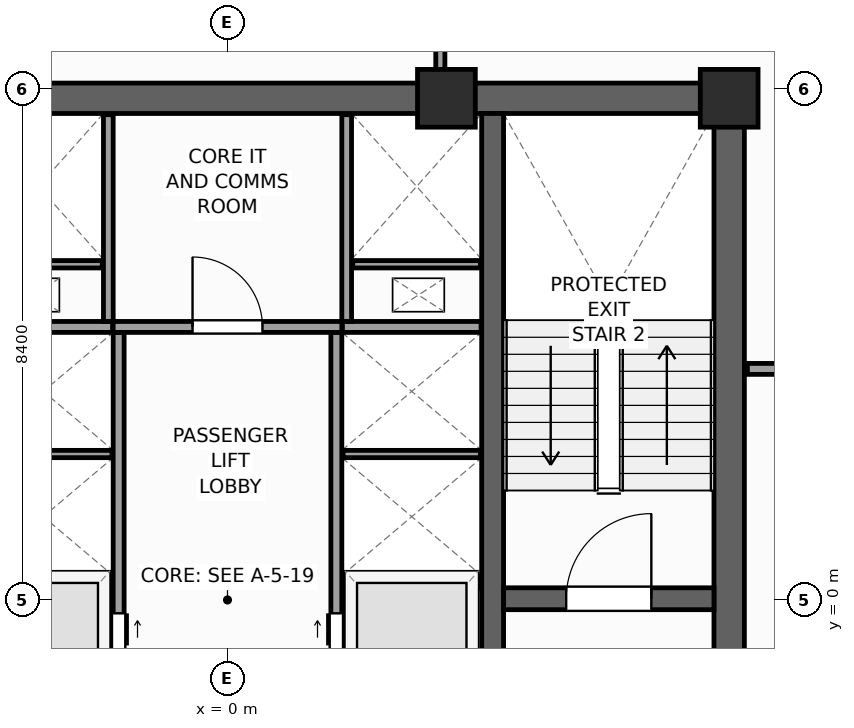
"""IFC4 building model, lengths in metres.
Left out: names, types, materials, properties, quantities, classifications, styles, units other than length and angle.
Written with IfcOpenShell. Run it as: python <this file> out.ifc"""

import sys

from ifc_helpers import new_model, si_unit, direction, frame, frame_2d, origin, origin_2d, place, context, subcontext, project, spatial, rectangle, extrude, source, transform, mapped, element, fill, save


model = new_model("IFC4")
c1 = context("Model", 3, precision=1e-05, world=origin(), true_north=direction((0.0, 1.0)))
c2 = subcontext(c1, "Body", "Model", "MODEL_VIEW")
j1 = project(units=[si_unit("LENGTHUNIT", "METRE"), si_unit("PLANEANGLEUNIT", "RADIAN")], contexts=[c1])
p1 = place(None, origin())
s1 = spatial("IfcSite", under=j1, at=p1, CompositionType="ELEMENT")
p2 = place(p1, origin())
s2 = spatial("IfcBuilding", under=s1, at=p2, CompositionType="ELEMENT")
p3 = place(p2, frame((0.0, 0.0, 229.0)))
s3 = spatial("IfcBuildingStorey", under=s2, at=p3, CompositionType="ELEMENT", Elevation=229.0)
p4 = place(p3, frame((-8.5, 8.25, 0.0), z_axis=(0.0, 0.0, 1.0), x_axis=(1.0, 0.0, 0.0)))
e1 = element("IfcWall", 1, at=p4, inside=s3, PredefinedType="SHEAR", context=c2, shape_type="SweptSolid", body=[
    extrude(rectangle(XDim=17.0, YDim=0.5, at=frame_2d((8.5, 0.0))), origin(), (0.0, 0.0, 1.0), 3.9),
])
p5 = place(p3, frame((8.25, -8.0, 0.0), z_axis=(0.0, 0.0, 1.0), x_axis=(0.0, 1.0, 0.0)))
e2 = element("IfcWall", 2, at=p5, inside=s3, PredefinedType="SHEAR", context=c2, shape_type="SweptSolid", body=[
    extrude(rectangle(XDim=16.0, YDim=0.5, at=frame_2d((8.0, 0.0))), origin(), (0.0, 0.0, 1.0), 3.9),
])
p6 = place(p5, frame((4.69, 0.0, 0.0)))
e3 = element("IfcOpeningElement", 3, at=p6, cuts=e2, PredefinedType="OPENING", context=c2, shape_type="SweptSolid", body=[
    extrude(rectangle(XDim=1.3, YDim=2.2, at=frame_2d((0.65, 1.1))), frame((0.0, 0.26, 0.0), z_axis=(0.0, -1.0, 0.0), x_axis=(1.0, 0.0, 0.0)), (0.0, 0.0, 1.0), 0.52),
])
p7 = place(p3, frame((4.36, -8.0, 0.0), z_axis=(0.0, 0.0, 1.0), x_axis=(0.0, 1.0, 0.0)))
e4 = element("IfcWall", 4, at=p7, inside=s3, PredefinedType="SHEAR", context=c2, shape_type="SweptSolid", body=[
    extrude(rectangle(XDim=16.0, YDim=0.36, at=frame_2d((8.0, 0.0))), origin(), (0.0, 0.0, 1.0), 3.9),
])
p8 = place(p3, frame((4.54, 0.02, 0.0), z_axis=(0.0, 0.0, 1.0), x_axis=(1.0, 0.0, 0.0)))
e5 = element("IfcWall", 5, at=p8, inside=s3, PredefinedType="SHEAR", context=c2, shape_type="SweptSolid", body=[
    extrude(rectangle(XDim=3.46, YDim=0.36, at=frame_2d((1.73, 0.0))), origin(), (0.0, 0.0, 1.0), 3.9),
])
p9 = place(p8, frame((1.03, 0.0, 0.0)))
e6 = element("IfcOpeningElement", 6, at=p9, cuts=e5, PredefinedType="OPENING", context=c2, shape_type="SweptSolid", body=[
    extrude(rectangle(XDim=1.4, YDim=2.2, at=frame_2d((0.7, 1.1))), frame((0.0, 0.19, 0.0), z_axis=(0.0, -1.0, 0.0), x_axis=(1.0, 0.0, 0.0)), (0.0, 0.0, 1.0), 0.38),
])
m1 = source(origin(), c2, "Body", "SweptSolid", [
    extrude(rectangle(XDim=0.95, YDim=0.95, at=origin_2d()), origin(), (0.0, 0.0, 1.0), 3.9),
])
for number, where, z_axis, x_axis in (
    (7, (8.25, 8.25, 0.0), (0.0, 0.0, 1.0), (1.0, 0.0, 0.0)),
    (8, (3.6, 8.25, 0.0), (0.0, 0.0, 1.0), (1.0, 0.0, 0.0)),
):
    element("IfcColumn", number, at=place(p3, frame(where, z_axis=z_axis, x_axis=x_axis)), inside=s3, PredefinedType="PILASTER", context=c2, shape_type="MappedRepresentation", body=[
        mapped(m1, transform((0.0, 0.0, 0.0), scale=1.0)),
    ])
p10 = place(p3, frame((6.733, -29.154, 0.0), z_axis=(0.0, 0.0, 1.0), x_axis=(0.629325378072, 0.77714192302, 0.0)))
e9 = element("IfcWall", 9, at=p10, inside=s3, PredefinedType="STANDARD", context=c2, shape_type="SweptSolid", body=[
    extrude(rectangle(XDim=36.84, YDim=0.34, at=frame_2d((18.42, 0.0))), origin(), (0.0, 0.0, 1.0), 2.96),
])
p11 = place(p10, frame((3.721, 0.0, 0.48)))
e10 = element("IfcOpeningElement", 10, at=p11, cuts=e9, PredefinedType="OPENING", context=c2, shape_type="SweptSolid", body=[
    extrude(rectangle(XDim=1.4, YDim=2.4, at=frame_2d((0.7, 1.2))), frame((0.0, 0.18, 0.0), z_axis=(0.0, -1.0, 0.0), x_axis=(1.0, 0.0, 0.0)), (0.0, 0.0, 1.0), 0.36),
])
p12 = place(p10, frame((9.809, 0.0, 0.58)))
e11 = element("IfcOpeningElement", 11, at=p12, cuts=e9, PredefinedType="OPENING", context=c2, shape_type="SweptSolid", body=[
    extrude(rectangle(XDim=1.75, YDim=2.3, at=frame_2d((0.875, 1.15))), frame((0.0, 0.18, 0.0), z_axis=(0.0, -1.0, 0.0), x_axis=(1.0, 0.0, 0.0)), (0.0, 0.0, 1.0), 0.36),
])
p13 = place(p10, frame((16.058, 0.0, 0.58)))
e12 = element("IfcOpeningElement", 12, at=p13, cuts=e9, PredefinedType="OPENING", context=c2, shape_type="SweptSolid", body=[
    extrude(rectangle(XDim=1.75, YDim=2.3, at=frame_2d((0.875, 1.15))), frame((0.0, 0.18, 0.0), z_axis=(0.0, -1.0, 0.0), x_axis=(1.0, 0.0, 0.0)), (0.0, 0.0, 1.0), 0.36),
])
p14 = place(p10, frame((24.176, 0.0, 0.58)))
e13 = element("IfcOpeningElement", 13, at=p14, cuts=e9, PredefinedType="OPENING", context=c2, shape_type="SweptSolid", body=[
    extrude(rectangle(XDim=1.75, YDim=2.3, at=frame_2d((0.875, 1.15))), frame((0.0, 0.18, 0.0), z_axis=(0.0, -1.0, 0.0), x_axis=(1.0, 0.0, 0.0)), (0.0, 0.0, 1.0), 0.36),
])
p15 = place(p10, frame((30.982, 0.0, 0.48)))
e14 = element("IfcOpeningElement", 14, at=p15, cuts=e9, PredefinedType="OPENING", context=c2, shape_type="SweptSolid", body=[
    extrude(rectangle(XDim=1.4, YDim=2.4, at=frame_2d((0.7, 1.2))), frame((0.0, 0.18, 0.0), z_axis=(0.0, -1.0, 0.0), x_axis=(1.0, 0.0, 0.0)), (0.0, 0.0, 1.0), 0.36),
])
p16 = place(p3, frame((29.154, 6.733, 0.0), z_axis=(0.0, 0.0, 1.0), x_axis=(-0.77714192302, 0.629325378072, 0.0)))
e15 = element("IfcWall", 15, at=p16, inside=s3, PredefinedType="STANDARD", context=c2, shape_type="SweptSolid", body=[
    extrude(rectangle(XDim=36.84, YDim=0.34, at=frame_2d((18.42, 0.0))), origin(), (0.0, 0.0, 1.0), 2.96),
])
p17 = place(p16, frame((23.495, 0.0, 0.0)))
e16 = element("IfcOpeningElement", 16, at=p17, cuts=e15, PredefinedType="OPENING", context=c2, shape_type="SweptSolid", body=[
    extrude(rectangle(XDim=1.05, YDim=2.25, at=frame_2d((0.525, 1.125))), frame((0.0, 0.18, 0.0), z_axis=(0.0, -1.0, 0.0), x_axis=(1.0, 0.0, 0.0)), (0.0, 0.0, 1.0), 0.36),
])
p18 = place(p16, frame((3.721, 0.0, 0.48)))
e17 = element("IfcOpeningElement", 17, at=p18, cuts=e15, PredefinedType="OPENING", context=c2, shape_type="SweptSolid", body=[
    extrude(rectangle(XDim=1.4, YDim=2.4, at=frame_2d((0.7, 1.2))), frame((0.0, 0.18, 0.0), z_axis=(0.0, -1.0, 0.0), x_axis=(1.0, 0.0, 0.0)), (0.0, 0.0, 1.0), 0.36),
])
p19 = place(p16, frame((9.809, 0.0, 0.58)))
e18 = element("IfcOpeningElement", 18, at=p19, cuts=e15, PredefinedType="OPENING", context=c2, shape_type="SweptSolid", body=[
    extrude(rectangle(XDim=1.75, YDim=2.3, at=frame_2d((0.875, 1.15))), frame((0.0, 0.18, 0.0), z_axis=(0.0, -1.0, 0.0), x_axis=(1.0, 0.0, 0.0)), (0.0, 0.0, 1.0), 0.36),
])
p20 = place(p16, frame((16.058, 0.0, 0.58)))
e19 = element("IfcOpeningElement", 19, at=p20, cuts=e15, PredefinedType="OPENING", context=c2, shape_type="SweptSolid", body=[
    extrude(rectangle(XDim=1.75, YDim=2.3, at=frame_2d((0.875, 1.15))), frame((0.0, 0.18, 0.0), z_axis=(0.0, -1.0, 0.0), x_axis=(1.0, 0.0, 0.0)), (0.0, 0.0, 1.0), 0.36),
])
p21 = place(p16, frame((25.676, 0.0, 0.58)))
e20 = element("IfcOpeningElement", 20, at=p21, cuts=e15, PredefinedType="OPENING", context=c2, shape_type="SweptSolid", body=[
    extrude(rectangle(XDim=1.75, YDim=2.3, at=frame_2d((0.875, 1.15))), frame((0.0, 0.18, 0.0), z_axis=(0.0, -1.0, 0.0), x_axis=(1.0, 0.0, 0.0)), (0.0, 0.0, 1.0), 0.36),
])
p22 = place(p16, frame((30.982, 0.0, 0.48)))
e21 = element("IfcOpeningElement", 21, at=p22, cuts=e15, PredefinedType="OPENING", context=c2, shape_type="SweptSolid", body=[
    extrude(rectangle(XDim=1.4, YDim=2.4, at=frame_2d((0.7, 1.2))), frame((0.0, 0.18, 0.0), z_axis=(0.0, -1.0, 0.0), x_axis=(1.0, 0.0, 0.0)), (0.0, 0.0, 1.0), 0.36),
])
p23 = place(p3, frame((-1.79, -7.98, 0.0), z_axis=(0.0, 0.0, 1.0), x_axis=(0.0, 1.0, 0.0)))
e22 = element("IfcWall", 22, at=p23, inside=s3, PredefinedType="PARTITIONING", context=c2, shape_type="SweptSolid", body=[
    extrude(rectangle(XDim=12.38, YDim=0.18, at=frame_2d((6.19, 0.0))), origin(), (0.0, 0.0, 1.0), 3.66),
])
p24 = place(p23, frame((4.6, 0.0, 0.0)))
e23 = element("IfcOpeningElement", 23, at=p24, cuts=e22, PredefinedType="OPENING", context=c2, shape_type="SweptSolid", body=[
    extrude(rectangle(XDim=1.1, YDim=2.2, at=frame_2d((0.55, 1.1))), frame((0.0, 0.1, 0.0), z_axis=(0.0, -1.0, 0.0), x_axis=(1.0, 0.0, 0.0)), (0.0, 0.0, 1.0), 0.2),
])
p25 = place(p23, frame((6.66, 0.0, 0.0)))
e24 = element("IfcOpeningElement", 24, at=p25, cuts=e22, PredefinedType="OPENING", context=c2, shape_type="SweptSolid", body=[
    extrude(rectangle(XDim=1.1, YDim=2.2, at=frame_2d((0.55, 1.1))), frame((0.0, 0.1, 0.0), z_axis=(0.0, -1.0, 0.0), x_axis=(1.0, 0.0, 0.0)), (0.0, 0.0, 1.0), 0.2),
])
p26 = place(p23, frame((1.4, 0.0, 0.0)))
e25 = element("IfcOpeningElement", 25, at=p26, cuts=e22, PredefinedType="OPENING", context=c2, shape_type="SweptSolid", body=[
    extrude(rectangle(XDim=1.15, YDim=2.25, at=frame_2d((0.575, 1.125))), frame((0.0, 0.1, 0.0), z_axis=(0.0, -1.0, 0.0), x_axis=(1.0, 0.0, 0.0)), (0.0, 0.0, 1.0), 0.2),
])
p27 = place(p3, frame((1.79, -7.98, 0.0), z_axis=(0.0, 0.0, 1.0), x_axis=(0.0, 1.0, 0.0)))
e26 = element("IfcWall", 26, at=p27, inside=s3, PredefinedType="PARTITIONING", context=c2, shape_type="SweptSolid", body=[
    extrude(rectangle(XDim=12.38, YDim=0.18, at=frame_2d((6.19, 0.0))), origin(), (0.0, 0.0, 1.0), 3.66),
])
p28 = place(p27, frame((4.6, 0.0, 0.0)))
e27 = element("IfcOpeningElement", 27, at=p28, cuts=e26, PredefinedType="OPENING", context=c2, shape_type="SweptSolid", body=[
    extrude(rectangle(XDim=1.1, YDim=2.2, at=frame_2d((0.55, 1.1))), frame((0.0, 0.1, 0.0), z_axis=(0.0, -1.0, 0.0), x_axis=(1.0, 0.0, 0.0)), (0.0, 0.0, 1.0), 0.2),
])
p29 = place(p27, frame((6.66, 0.0, 0.0)))
e28 = element("IfcOpeningElement", 28, at=p29, cuts=e26, PredefinedType="OPENING", context=c2, shape_type="SweptSolid", body=[
    extrude(rectangle(XDim=1.1, YDim=2.2, at=frame_2d((0.55, 1.1))), frame((0.0, 0.1, 0.0), z_axis=(0.0, -1.0, 0.0), x_axis=(1.0, 0.0, 0.0)), (0.0, 0.0, 1.0), 0.2),
])
p30 = place(p27, frame((0.35, 0.0, 0.0)))
e29 = element("IfcOpeningElement", 29, at=p30, cuts=e26, PredefinedType="OPENING", context=c2, shape_type="SweptSolid", body=[
    extrude(rectangle(XDim=0.88, YDim=2.1, at=frame_2d((0.44, 1.05))), frame((0.0, 0.1, 0.0), z_axis=(0.0, -1.0, 0.0), x_axis=(1.0, 0.0, 0.0)), (0.0, 0.0, 1.0), 0.2),
])
p31 = place(p27, frame((2.25, 0.0, 0.0)))
e30 = element("IfcOpeningElement", 30, at=p31, cuts=e26, PredefinedType="OPENING", context=c2, shape_type="SweptSolid", body=[
    extrude(rectangle(XDim=1.15, YDim=2.25, at=frame_2d((0.575, 1.125))), frame((0.0, 0.1, 0.0), z_axis=(0.0, -1.0, 0.0), x_axis=(1.0, 0.0, 0.0)), (0.0, 0.0, 1.0), 0.2),
])
p32 = place(p3, frame((-1.88, 4.49, 0.0), z_axis=(0.0, 0.0, 1.0), x_axis=(1.0, 0.0, 0.0)))
e31 = element("IfcWall", 31, at=p32, inside=s3, PredefinedType="PARTITIONING", context=c2, shape_type="SweptSolid", body=[
    extrude(rectangle(XDim=3.76, YDim=0.18, at=frame_2d((1.88, 0.0))), origin(), (0.0, 0.0, 1.0), 3.66),
])
p33 = place(p32, frame((1.305, 0.0, 0.0)))
e32 = element("IfcOpeningElement", 32, at=p33, cuts=e31, PredefinedType="OPENING", context=c2, shape_type="SweptSolid", body=[
    extrude(rectangle(XDim=1.15, YDim=2.25, at=frame_2d((0.575, 1.125))), frame((0.0, 0.1, 0.0), z_axis=(0.0, -1.0, 0.0), x_axis=(1.0, 0.0, 0.0)), (0.0, 0.0, 1.0), 0.2),
])
for number, where, z_axis, x_axis in (
    (33, (-4.17, 0.3, 0.0), (0.0, 0.0, 1.0), (1.0, 0.0, 0.0)),
    (34, (1.89, 0.3, 0.0), (0.0, 0.0, 1.0), (1.0, 0.0, 0.0)),
    (35, (-4.17, 4.49, 0.0), (0.0, 0.0, 1.0), (1.0, 0.0, 0.0)),
    (36, (1.89, 4.49, 0.0), (0.0, 0.0, 1.0), (1.0, 0.0, 0.0)),
):
    element("IfcWall", number, at=place(p3, frame(where, z_axis=z_axis, x_axis=x_axis)), inside=s3, PredefinedType="PARTITIONING", context=c2, shape_type="SweptSolid", body=[
        extrude(rectangle(XDim=2.28, YDim=0.18, at=frame_2d((1.14, 0.0))), origin(), (0.0, 0.0, 1.0), 3.66),
    ])
for number, where, z_axis, x_axis in (
    (37, (-4.16, 2.4, 0.0), (0.0, 0.0, 1.0), (1.0, 0.0, 0.0)),
    (38, (1.9, 2.4, 0.0), (0.0, 0.0, 1.0), (1.0, 0.0, 0.0)),
):
    element("IfcWall", number, at=place(p3, frame(where, z_axis=z_axis, x_axis=x_axis)), inside=s3, PredefinedType="PARTITIONING", context=c2, shape_type="SweptSolid", body=[
        extrude(rectangle(XDim=2.26, YDim=0.12, at=frame_2d((1.13, 0.0))), origin(), (0.0, 0.0, 1.0), 3.66),
    ])
for number, where, z_axis, x_axis in (
    (39, (-1.96, 4.58, 0.0), (0.0, 0.0, 1.0), (0.0, 1.0, 0.0)),
    (40, (1.96, 4.58, 0.0), (0.0, 0.0, 1.0), (0.0, 1.0, 0.0)),
):
    element("IfcWall", number, at=place(p3, frame(where, z_axis=z_axis, x_axis=x_axis)), inside=s3, PredefinedType="PARTITIONING", context=c2, shape_type="SweptSolid", body=[
        extrude(rectangle(XDim=3.4, YDim=0.16, at=frame_2d((1.7, 0.0))), origin(), (0.0, 0.0, 1.0), 3.66),
    ])
for number, where, z_axis, x_axis in (
    (41, (-4.16, 5.52, 0.0), (0.0, 0.0, 1.0), (1.0, 0.0, 0.0)),
    (42, (2.06, 5.52, 0.0), (0.0, 0.0, 1.0), (1.0, 0.0, 0.0)),
):
    element("IfcWall", number, at=place(p3, frame(where, z_axis=z_axis, x_axis=x_axis)), inside=s3, PredefinedType="PARTITIONING", context=c2, shape_type="SweptSolid", body=[
        extrude(rectangle(XDim=2.1, YDim=0.12, at=frame_2d((1.05, 0.0))), origin(), (0.0, 0.0, 1.0), 3.66),
    ])
p34 = place(p3, frame((8.55, 3.8, 0.0), z_axis=(0.0, 0.0, 1.0), x_axis=(1.0, 0.0, 0.0)))
e43 = element("IfcWall", 43, at=p34, inside=s3, PredefinedType="PARTITIONING", context=c2, shape_type="SweptSolid", body=[
    extrude(rectangle(XDim=3.9, YDim=0.18, at=frame_2d((1.95, 0.0))), origin(), (0.0, 0.0, 1.0), 3.66),
])
p35 = place(p34, frame((1.4, 0.0, 0.0)))
e44 = element("IfcOpeningElement", 44, at=p35, cuts=e43, PredefinedType="OPENING", context=c2, shape_type="SweptSolid", body=[
    extrude(rectangle(XDim=1.1, YDim=2.2, at=frame_2d((0.55, 1.1))), frame((0.0, 0.1, 0.0), z_axis=(0.0, -1.0, 0.0), x_axis=(1.0, 0.0, 0.0)), (0.0, 0.0, 1.0), 0.2),
])
p36 = place(p3, frame((3.5, 8.505, 0.0), z_axis=(0.0, 0.0, 1.0), x_axis=(0.0, 1.0, 0.0)))
e45 = element("IfcWall", 45, at=p36, inside=s3, PredefinedType="PARTITIONING", context=c2, shape_type="SweptSolid", body=[
    extrude(rectangle(XDim=18.868, YDim=0.15, at=frame_2d((9.434, 0.0))), origin(), (0.0, 0.0, 1.0), 3.66),
])
m2 = source(origin(), c2, "Body", "SweptSolid", [
    extrude(rectangle(XDim=1.4, YDim=2.2, at=frame_2d((0.7, 1.1))), frame((0.0, 0.025, 0.0), z_axis=(0.0, -1.0, 0.0), x_axis=(1.0, 0.0, 0.0)), (0.0, 0.0, 1.0), 0.05),
])
p37 = place(p9, origin())
e46 = element("IfcDoor", 46, at=p37, inside=s3, OperationType="SINGLE_SWING_RIGHT", PredefinedType="DOOR", context=c2, shape_type="MappedRepresentation", body=[
    mapped(m2, transform((0.0, 0.0, 0.0), scale=1.0)),
])
fill(e6, e46)
m3 = source(origin(), c2, "Body", "SweptSolid", [
    extrude(rectangle(XDim=1.1, YDim=2.2, at=frame_2d((0.55, 1.1))), frame((0.0, 0.025, 0.0), z_axis=(0.0, -1.0, 0.0), x_axis=(1.0, 0.0, 0.0)), (0.0, 0.0, 1.0), 0.05),
])
p38 = place(p25, frame((1.1, 0.0, 0.0), z_axis=(0.0, 0.0, 1.0), x_axis=(-1.0, 0.0, 0.0)))
e47 = element("IfcDoor", 47, at=p38, inside=s3, OperationType="DOUBLE_DOOR_SLIDING", PredefinedType="DOOR", context=c2, shape_type="MappedRepresentation", body=[
    mapped(m3, transform((0.0, 0.0, 0.0), scale=1.0)),
])
fill(e24, e47)
p39 = place(p29, origin())
e48 = element("IfcDoor", 48, at=p39, inside=s3, OperationType="DOUBLE_DOOR_SLIDING", PredefinedType="DOOR", context=c2, shape_type="MappedRepresentation", body=[
    mapped(m3, transform((0.0, 0.0, 0.0), scale=1.0)),
])
fill(e28, e48)
m4 = source(origin(), c2, "Body", "SweptSolid", [
    extrude(rectangle(XDim=1.15, YDim=2.25, at=frame_2d((0.575, 1.125))), frame((0.0, 0.025, 0.0), z_axis=(0.0, -1.0, 0.0), x_axis=(1.0, 0.0, 0.0)), (0.0, 0.0, 1.0), 0.05),
])
p40 = place(p33, origin())
e49 = element("IfcDoor", 49, at=p40, inside=s3, OperationType="SINGLE_SWING_LEFT", PredefinedType="DOOR", context=c2, shape_type="MappedRepresentation", body=[
    mapped(m4, transform((0.0, 0.0, 0.0), scale=1.0)),
])
fill(e32, e49)
save(model, sys.argv[1])
